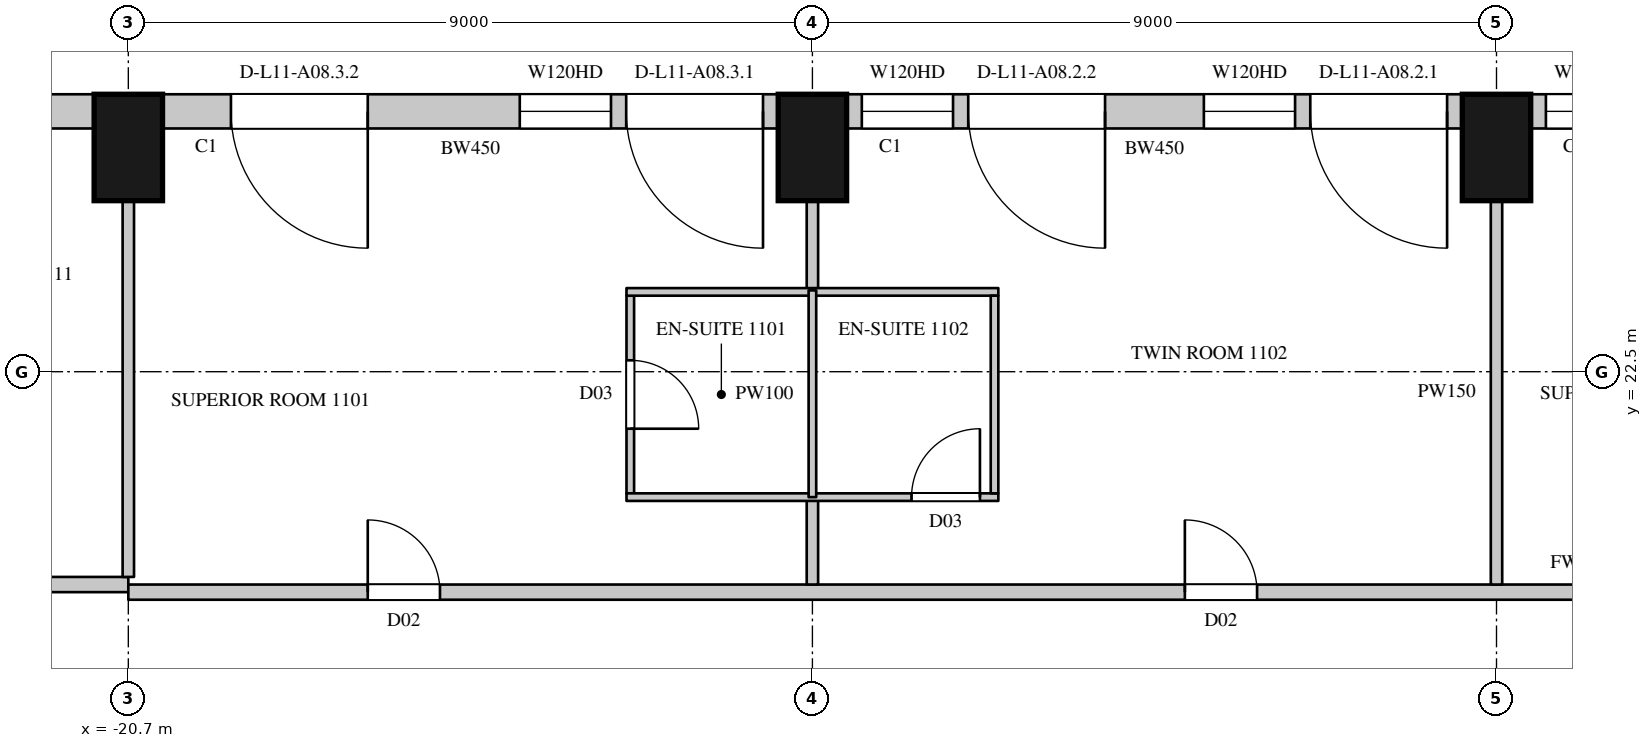
"""IFC4 building model, lengths in metres.
Left out: names, types, materials, properties, quantities, classifications, styles, units other than length and angle.
Written with IfcOpenShell. Run it as: python <this file> out.ifc"""

import sys

from ifc_helpers import new_model, si_unit, direction, frame, frame_2d, origin, origin_2d, place, context, subcontext, project, spatial, rectangle, extrude, element, fill, save


model = new_model("IFC4")
c1 = context("Model", 3, precision=1e-05, world=origin(), true_north=direction((0.0, 1.0)))
c2 = subcontext(c1, "Body", "Model", "MODEL_VIEW")
j1 = project(units=[si_unit("LENGTHUNIT", "METRE"), si_unit("PLANEANGLEUNIT", "RADIAN")], contexts=[c1])
p1 = place(None, origin())
s1 = spatial("IfcSite", under=j1, at=p1, CompositionType="ELEMENT")
p2 = place(p1, origin())
s2 = spatial("IfcBuilding", under=s1, at=p2, CompositionType="ELEMENT")
p3 = place(p2, frame((0.0, 0.0, 69.9)))
s3 = spatial("IfcBuildingStorey", under=s2, at=p3, CompositionType="ELEMENT", Elevation=69.9)
for number, where, z_axis, x_axis in (
    (1, (-2.7, 25.45, 0.0), (0.0, 0.0, 1.0), (-1.0, 0.0, 0.0)),
    (2, (-11.7, 25.45, 0.0), (0.0, 0.0, 1.0), (-1.0, 0.0, 0.0)),
    (3, (-20.7, 25.45, 0.0), (0.0, 0.0, 1.0), (-1.0, 0.0, 0.0)),
):
    element("IfcColumn", number, at=place(p3, frame(where, z_axis=z_axis, x_axis=x_axis)), inside=s3, PredefinedType="COLUMN", context=c2, shape_type="SweptSolid", body=[
        extrude(rectangle(XDim=0.9, YDim=1.4, at=origin_2d()), origin(), (0.0, 0.0, 1.0), 3.6),
    ])
p4 = place(p3, frame((5.85, 25.925, 0.0), z_axis=(0.0, 0.0, 1.0), x_axis=(-1.0, 0.0, 0.0)))
e4 = element("IfcWall", 4, at=p4, inside=s3, PredefinedType="SOLIDWALL", context=c2, shape_type="SweptSolid", body=[
    extrude(rectangle(XDim=8.1, YDim=0.45, at=frame_2d((4.05, 0.0))), origin(), (0.0, 0.0, 1.0), 3.3),
])
p5 = place(p4, frame((0.2, 0.0, 0.0)))
e5 = element("IfcOpeningElement", 5, at=p5, cuts=e4, PredefinedType="OPENING", context=c2, shape_type="SweptSolid", body=[
    extrude(rectangle(XDim=1.8, YDim=2.4, at=frame_2d((0.9, 1.2))), frame((0.0, 0.235, 0.0), z_axis=(0.0, -1.0, 0.0), x_axis=(1.0, 0.0, 0.0)), (0.0, 0.0, 1.0), 0.47),
])
p6 = place(p4, frame((2.2, 0.0, 1.05)))
e6 = element("IfcOpeningElement", 6, at=p6, cuts=e4, PredefinedType="OPENING", context=c2, shape_type="SweptSolid", body=[
    extrude(rectangle(XDim=1.2, YDim=2.0, at=frame_2d((0.6, 1.0))), frame((0.0, 0.235, 0.0), z_axis=(0.0, -1.0, 0.0), x_axis=(1.0, 0.0, 0.0)), (0.0, 0.0, 1.0), 0.47),
])
p7 = place(p4, frame((4.7, 0.0, 0.0)))
e7 = element("IfcOpeningElement", 7, at=p7, cuts=e4, PredefinedType="OPENING", context=c2, shape_type="SweptSolid", body=[
    extrude(rectangle(XDim=1.8, YDim=2.4, at=frame_2d((0.9, 1.2))), frame((0.0, 0.235, 0.0), z_axis=(0.0, -1.0, 0.0), x_axis=(1.0, 0.0, 0.0)), (0.0, 0.0, 1.0), 0.47),
])
p8 = place(p4, frame((6.7, 0.0, 1.05)))
e8 = element("IfcOpeningElement", 8, at=p8, cuts=e4, PredefinedType="OPENING", context=c2, shape_type="SweptSolid", body=[
    extrude(rectangle(XDim=1.2, YDim=2.0, at=frame_2d((0.6, 1.0))), frame((0.0, 0.235, 0.0), z_axis=(0.0, -1.0, 0.0), x_axis=(1.0, 0.0, 0.0)), (0.0, 0.0, 1.0), 0.47),
])
p9 = place(p3, frame((-3.15, 25.925, 0.0), z_axis=(0.0, 0.0, 1.0), x_axis=(-1.0, 0.0, 0.0)))
e9 = element("IfcWall", 9, at=p9, inside=s3, PredefinedType="SOLIDWALL", context=c2, shape_type="SweptSolid", body=[
    extrude(rectangle(XDim=8.1, YDim=0.45, at=frame_2d((4.05, 0.0))), origin(), (0.0, 0.0, 1.0), 3.3),
])
p10 = place(p9, frame((0.2, 0.0, 0.0)))
e10 = element("IfcOpeningElement", 10, at=p10, cuts=e9, PredefinedType="OPENING", context=c2, shape_type="SweptSolid", body=[
    extrude(rectangle(XDim=1.8, YDim=2.4, at=frame_2d((0.9, 1.2))), frame((0.0, 0.235, 0.0), z_axis=(0.0, -1.0, 0.0), x_axis=(1.0, 0.0, 0.0)), (0.0, 0.0, 1.0), 0.47),
])
p11 = place(p9, frame((2.2, 0.0, 1.05)))
e11 = element("IfcOpeningElement", 11, at=p11, cuts=e9, PredefinedType="OPENING", context=c2, shape_type="SweptSolid", body=[
    extrude(rectangle(XDim=1.2, YDim=2.0, at=frame_2d((0.6, 1.0))), frame((0.0, 0.235, 0.0), z_axis=(0.0, -1.0, 0.0), x_axis=(1.0, 0.0, 0.0)), (0.0, 0.0, 1.0), 0.47),
])
p12 = place(p9, frame((4.7, 0.0, 0.0)))
e12 = element("IfcOpeningElement", 12, at=p12, cuts=e9, PredefinedType="OPENING", context=c2, shape_type="SweptSolid", body=[
    extrude(rectangle(XDim=1.8, YDim=2.4, at=frame_2d((0.9, 1.2))), frame((0.0, 0.235, 0.0), z_axis=(0.0, -1.0, 0.0), x_axis=(1.0, 0.0, 0.0)), (0.0, 0.0, 1.0), 0.47),
])
p13 = place(p9, frame((6.7, 0.0, 1.05)))
e13 = element("IfcOpeningElement", 13, at=p13, cuts=e9, PredefinedType="OPENING", context=c2, shape_type="SweptSolid", body=[
    extrude(rectangle(XDim=1.2, YDim=2.0, at=frame_2d((0.6, 1.0))), frame((0.0, 0.235, 0.0), z_axis=(0.0, -1.0, 0.0), x_axis=(1.0, 0.0, 0.0)), (0.0, 0.0, 1.0), 0.47),
])
p14 = place(p3, frame((-12.15, 25.925, 0.0), z_axis=(0.0, 0.0, 1.0), x_axis=(-1.0, 0.0, 0.0)))
e14 = element("IfcWall", 14, at=p14, inside=s3, PredefinedType="SOLIDWALL", context=c2, shape_type="SweptSolid", body=[
    extrude(rectangle(XDim=8.1, YDim=0.45, at=frame_2d((4.05, 0.0))), origin(), (0.0, 0.0, 1.0), 3.3),
])
p15 = place(p14, frame((0.2, 0.0, 0.0)))
e15 = element("IfcOpeningElement", 15, at=p15, cuts=e14, PredefinedType="OPENING", context=c2, shape_type="SweptSolid", body=[
    extrude(rectangle(XDim=1.8, YDim=2.4, at=frame_2d((0.9, 1.2))), frame((0.0, 0.235, 0.0), z_axis=(0.0, -1.0, 0.0), x_axis=(1.0, 0.0, 0.0)), (0.0, 0.0, 1.0), 0.47),
])
p16 = place(p14, frame((2.2, 0.0, 1.05)))
e16 = element("IfcOpeningElement", 16, at=p16, cuts=e14, PredefinedType="OPENING", context=c2, shape_type="SweptSolid", body=[
    extrude(rectangle(XDim=1.2, YDim=2.0, at=frame_2d((0.6, 1.0))), frame((0.0, 0.235, 0.0), z_axis=(0.0, -1.0, 0.0), x_axis=(1.0, 0.0, 0.0)), (0.0, 0.0, 1.0), 0.47),
])
p17 = place(p14, frame((5.4, 0.0, 0.0)))
e17 = element("IfcOpeningElement", 17, at=p17, cuts=e14, PredefinedType="OPENING", context=c2, shape_type="SweptSolid", body=[
    extrude(rectangle(XDim=1.8, YDim=2.4, at=frame_2d((0.9, 1.2))), frame((0.0, 0.235, 0.0), z_axis=(0.0, -1.0, 0.0), x_axis=(1.0, 0.0, 0.0)), (0.0, 0.0, 1.0), 0.47),
])
p18 = place(p3, frame((-21.15, 25.925, 0.0), z_axis=(0.0, 0.0, 1.0), x_axis=(-1.0, 0.0, 0.0)))
e18 = element("IfcWall", 18, at=p18, inside=s3, PredefinedType="SOLIDWALL", context=c2, shape_type="SweptSolid", body=[
    extrude(rectangle(XDim=2.914, YDim=0.45, at=frame_2d((1.457, 0.0))), origin(), (0.0, 0.0, 1.0), 3.3),
])
p19 = place(p3, frame((-23.7, 19.7, 0.0), z_axis=(0.0, 0.0, 1.0), x_axis=(1.0, 0.0, 0.0)))
e19 = element("IfcWall", 19, at=p19, inside=s3, PredefinedType="PARTITIONING", context=c2, shape_type="SweptSolid", body=[
    extrude(rectangle(XDim=3.0, YDim=0.2, at=frame_2d((1.5, 0.0))), origin(), (0.0, 0.0, 1.0), 3.3),
])
p20 = place(p19, frame((0.8, 0.0, 0.0)))
e20 = element("IfcOpeningElement", 20, at=p20, cuts=e19, PredefinedType="OPENING", context=c2, shape_type="SweptSolid", body=[
    extrude(rectangle(XDim=0.9, YDim=2.2, at=frame_2d((0.45, 1.1))), frame((0.0, 0.11, 0.0), z_axis=(0.0, -1.0, 0.0), x_axis=(1.0, 0.0, 0.0)), (0.0, 0.0, 1.0), 0.22),
])
p21 = place(p3, frame((-20.7, 19.6, 0.0), z_axis=(0.0, 0.0, 1.0), x_axis=(1.0, 0.0, 0.0)))
e21 = element("IfcWall", 21, at=p21, inside=s3, PredefinedType="PARTITIONING", context=c2, shape_type="SweptSolid", body=[
    extrude(rectangle(XDim=38.184, YDim=0.2, at=frame_2d((19.092, 0.0))), origin(), (0.0, 0.0, 1.0), 3.3),
])
p22 = place(p21, frame((3.15, 0.0, 0.0)))
e22 = element("IfcOpeningElement", 22, at=p22, cuts=e21, PredefinedType="OPENING", context=c2, shape_type="SweptSolid", body=[
    extrude(rectangle(XDim=0.95, YDim=2.2, at=frame_2d((0.475, 1.1))), frame((0.0, 0.11, 0.0), z_axis=(0.0, -1.0, 0.0), x_axis=(1.0, 0.0, 0.0)), (0.0, 0.0, 1.0), 0.22),
])
p23 = place(p21, frame((13.9, 0.0, 0.0)))
e23 = element("IfcOpeningElement", 23, at=p23, cuts=e21, PredefinedType="OPENING", context=c2, shape_type="SweptSolid", body=[
    extrude(rectangle(XDim=0.95, YDim=2.2, at=frame_2d((0.475, 1.1))), frame((0.0, 0.11, 0.0), z_axis=(0.0, -1.0, 0.0), x_axis=(1.0, 0.0, 0.0)), (0.0, 0.0, 1.0), 0.22),
])
p24 = place(p21, frame((21.15, 0.0, 0.0)))
e24 = element("IfcOpeningElement", 24, at=p24, cuts=e21, PredefinedType="OPENING", context=c2, shape_type="SweptSolid", body=[
    extrude(rectangle(XDim=0.95, YDim=2.2, at=frame_2d((0.475, 1.1))), frame((0.0, 0.11, 0.0), z_axis=(0.0, -1.0, 0.0), x_axis=(1.0, 0.0, 0.0)), (0.0, 0.0, 1.0), 0.22),
])
p25 = place(p21, frame((31.9, 0.0, 0.0)))
e25 = element("IfcOpeningElement", 25, at=p25, cuts=e21, PredefinedType="OPENING", context=c2, shape_type="SweptSolid", body=[
    extrude(rectangle(XDim=0.95, YDim=2.2, at=frame_2d((0.475, 1.1))), frame((0.0, 0.11, 0.0), z_axis=(0.0, -1.0, 0.0), x_axis=(1.0, 0.0, 0.0)), (0.0, 0.0, 1.0), 0.22),
])
p26 = place(p21, frame((36.85, 0.0, 0.0)))
e26 = element("IfcOpeningElement", 26, at=p26, cuts=e21, PredefinedType="OPENING", context=c2, shape_type="SweptSolid", body=[
    extrude(rectangle(XDim=0.95, YDim=2.2, at=frame_2d((0.475, 1.1))), frame((0.0, 0.11, 0.0), z_axis=(0.0, -1.0, 0.0), x_axis=(1.0, 0.0, 0.0)), (0.0, 0.0, 1.0), 0.22),
])
p27 = place(p3, frame((-20.7, 19.8, 0.0), z_axis=(0.0, 0.0, 1.0), x_axis=(0.0, 1.0, 0.0)))
e27 = element("IfcWall", 27, at=p27, inside=s3, PredefinedType="PARTITIONING", context=c2, shape_type="SweptSolid", body=[
    extrude(rectangle(XDim=4.95, YDim=0.15, at=frame_2d((2.475, 0.0))), origin(), (0.0, 0.0, 1.0), 2.75),
])
p28 = place(p3, frame((-11.7, 19.7, 0.0), z_axis=(0.0, 0.0, 1.0), x_axis=(0.0, 1.0, 0.0)))
e28 = element("IfcWall", 28, at=p28, inside=s3, PredefinedType="PARTITIONING", context=c2, shape_type="SweptSolid", body=[
    extrude(rectangle(XDim=1.15, YDim=0.15, at=frame_2d((0.575, 0.0))), origin(), (0.0, 0.0, 1.0), 2.75),
])
p29 = place(p3, frame((-11.7, 23.57, 0.0), z_axis=(0.0, 0.0, 1.0), x_axis=(0.0, 1.0, 0.0)))
e29 = element("IfcWall", 29, at=p29, inside=s3, PredefinedType="PARTITIONING", context=c2, shape_type="SweptSolid", body=[
    extrude(rectangle(XDim=1.18, YDim=0.15, at=frame_2d((0.59, 0.0))), origin(), (0.0, 0.0, 1.0), 2.75),
])
p30 = place(p3, frame((-2.7, 19.7, 0.0), z_axis=(0.0, 0.0, 1.0), x_axis=(0.0, 1.0, 0.0)))
e30 = element("IfcWall", 30, at=p30, inside=s3, PredefinedType="PARTITIONING", context=c2, shape_type="SweptSolid", body=[
    extrude(rectangle(XDim=5.05, YDim=0.15, at=frame_2d((2.525, 0.0))), origin(), (0.0, 0.0, 1.0), 2.75),
])
p31 = place(p3, frame((-14.096, 20.9, 0.0), z_axis=(0.0, 0.0, 1.0), x_axis=(0.0, 1.0, 0.0)))
e31 = element("IfcWall", 31, at=p31, inside=s3, PredefinedType="PARTITIONING", context=c2, shape_type="SweptSolid", body=[
    extrude(rectangle(XDim=2.6, YDim=0.1, at=frame_2d((1.3, 0.0))), origin(), (0.0, 0.0, 1.0), 3.3),
])
p32 = place(p31, frame((0.85, 0.0, 0.0)))
e32 = element("IfcOpeningElement", 32, at=p32, cuts=e31, PredefinedType="OPENING", context=c2, shape_type="SweptSolid", body=[
    extrude(rectangle(XDim=0.9, YDim=2.2, at=frame_2d((0.45, 1.1))), frame((0.0, 0.06, 0.0), z_axis=(0.0, -1.0, 0.0), x_axis=(1.0, 0.0, 0.0)), (0.0, 0.0, 1.0), 0.12),
])
p33 = place(p3, frame((-14.146, 20.85, 0.0), z_axis=(0.0, 0.0, 1.0), x_axis=(1.0, 0.0, 0.0)))
e33 = element("IfcWall", 33, at=p33, inside=s3, PredefinedType="PARTITIONING", context=c2, shape_type="SweptSolid", body=[
    extrude(rectangle(XDim=4.892, YDim=0.1, at=frame_2d((2.446, 0.0))), origin(), (0.0, 0.0, 1.0), 3.3),
])
p34 = place(p33, frame((3.75, 0.0, 0.0)))
e34 = element("IfcOpeningElement", 34, at=p34, cuts=e33, PredefinedType="OPENING", context=c2, shape_type="SweptSolid", body=[
    extrude(rectangle(XDim=0.9, YDim=2.2, at=frame_2d((0.45, 1.1))), frame((0.0, 0.06, 0.0), z_axis=(0.0, -1.0, 0.0), x_axis=(1.0, 0.0, 0.0)), (0.0, 0.0, 1.0), 0.12),
])
p35 = place(p3, frame((-14.146, 23.55, 0.0), z_axis=(0.0, 0.0, 1.0), x_axis=(1.0, 0.0, 0.0)))
e35 = element("IfcWall", 35, at=p35, inside=s3, PredefinedType="PARTITIONING", context=c2, shape_type="SweptSolid", body=[
    extrude(rectangle(XDim=4.892, YDim=0.1, at=frame_2d((2.446, 0.0))), origin(), (0.0, 0.0, 1.0), 3.3),
])
p36 = place(p3, frame((-11.7, 20.85, 0.0), z_axis=(0.0, 0.0, 1.0), x_axis=(0.0, 1.0, 0.0)))
e36 = element("IfcWall", 36, at=p36, inside=s3, PredefinedType="PARTITIONING", context=c2, shape_type="SweptSolid", body=[
    extrude(rectangle(XDim=2.72, YDim=0.1, at=frame_2d((1.36, 0.0))), origin(), (0.0, 0.0, 1.0), 2.75),
])
p37 = place(p3, frame((-9.304, 20.9, 0.0), z_axis=(0.0, 0.0, 1.0), x_axis=(0.0, 1.0, 0.0)))
e37 = element("IfcWall", 37, at=p37, inside=s3, PredefinedType="PARTITIONING", context=c2, shape_type="SweptSolid", body=[
    extrude(rectangle(XDim=2.6, YDim=0.1, at=frame_2d((1.3, 0.0))), origin(), (0.0, 0.0, 1.0), 3.3),
])
p38 = place(p8, origin())
e38 = element("IfcWindow", 38, at=p38, inside=s3, PartitioningType="SINGLE_PANEL", PredefinedType="WINDOW", context=c2, shape_type="SweptSolid", body=[
    extrude(rectangle(XDim=1.2, YDim=2.0, at=frame_2d((0.6, 1.0))), frame((0.0, 0.135, 0.0), z_axis=(0.0, -1.0, 0.0), x_axis=(1.0, 0.0, 0.0)), (0.0, 0.0, 1.0), 0.06),
])
fill(e8, e38)
p39 = place(p10, origin())
e39 = element("IfcDoor", 39, at=p39, inside=s3, OperationType="SLIDING_TO_LEFT", PredefinedType="DOOR", context=c2, shape_type="SweptSolid", body=[
    extrude(rectangle(XDim=1.8, YDim=2.4, at=frame_2d((0.9, 1.2))), frame((0.0, 0.13, 0.0), z_axis=(0.0, -1.0, 0.0), x_axis=(1.0, 0.0, 0.0)), (0.0, 0.0, 1.0), 0.05),
])
fill(e10, e39)
p40 = place(p11, origin())
e40 = element("IfcWindow", 40, at=p40, inside=s3, PartitioningType="SINGLE_PANEL", PredefinedType="WINDOW", context=c2, shape_type="SweptSolid", body=[
    extrude(rectangle(XDim=1.2, YDim=2.0, at=frame_2d((0.6, 1.0))), frame((0.0, 0.135, 0.0), z_axis=(0.0, -1.0, 0.0), x_axis=(1.0, 0.0, 0.0)), (0.0, 0.0, 1.0), 0.06),
])
fill(e11, e40)
p41 = place(p12, origin())
e41 = element("IfcDoor", 41, at=p41, inside=s3, OperationType="SLIDING_TO_LEFT", PredefinedType="DOOR", context=c2, shape_type="SweptSolid", body=[
    extrude(rectangle(XDim=1.8, YDim=2.4, at=frame_2d((0.9, 1.2))), frame((0.0, 0.13, 0.0), z_axis=(0.0, -1.0, 0.0), x_axis=(1.0, 0.0, 0.0)), (0.0, 0.0, 1.0), 0.05),
])
fill(e12, e41)
p42 = place(p13, origin())
e42 = element("IfcWindow", 42, at=p42, inside=s3, PartitioningType="SINGLE_PANEL", PredefinedType="WINDOW", context=c2, shape_type="SweptSolid", body=[
    extrude(rectangle(XDim=1.2, YDim=2.0, at=frame_2d((0.6, 1.0))), frame((0.0, 0.135, 0.0), z_axis=(0.0, -1.0, 0.0), x_axis=(1.0, 0.0, 0.0)), (0.0, 0.0, 1.0), 0.06),
])
fill(e13, e42)
p43 = place(p15, origin())
e43 = element("IfcDoor", 43, at=p43, inside=s3, OperationType="SLIDING_TO_LEFT", PredefinedType="DOOR", context=c2, shape_type="SweptSolid", body=[
    extrude(rectangle(XDim=1.8, YDim=2.4, at=frame_2d((0.9, 1.2))), frame((0.0, 0.13, 0.0), z_axis=(0.0, -1.0, 0.0), x_axis=(1.0, 0.0, 0.0)), (0.0, 0.0, 1.0), 0.05),
])
fill(e15, e43)
p44 = place(p16, origin())
e44 = element("IfcWindow", 44, at=p44, inside=s3, PartitioningType="SINGLE_PANEL", PredefinedType="WINDOW", context=c2, shape_type="SweptSolid", body=[
    extrude(rectangle(XDim=1.2, YDim=2.0, at=frame_2d((0.6, 1.0))), frame((0.0, 0.135, 0.0), z_axis=(0.0, -1.0, 0.0), x_axis=(1.0, 0.0, 0.0)), (0.0, 0.0, 1.0), 0.06),
])
fill(e16, e44)
p45 = place(p17, origin())
e45 = element("IfcDoor", 45, at=p45, inside=s3, OperationType="SLIDING_TO_LEFT", PredefinedType="DOOR", context=c2, shape_type="SweptSolid", body=[
    extrude(rectangle(XDim=1.8, YDim=2.4, at=frame_2d((0.9, 1.2))), frame((0.0, 0.13, 0.0), z_axis=(0.0, -1.0, 0.0), x_axis=(1.0, 0.0, 0.0)), (0.0, 0.0, 1.0), 0.05),
])
fill(e17, e45)
p46 = place(p22, origin())
e46 = element("IfcDoor", 46, at=p46, inside=s3, OperationType="SINGLE_SWING_LEFT", PredefinedType="DOOR", context=c2, shape_type="SweptSolid", body=[
    extrude(rectangle(XDim=0.95, YDim=2.2, at=frame_2d((0.475, 1.1))), frame((0.0, 0.025, 0.0), z_axis=(0.0, -1.0, 0.0), x_axis=(1.0, 0.0, 0.0)), (0.0, 0.0, 1.0), 0.05),
])
fill(e22, e46)
p47 = place(p32, origin())
e47 = element("IfcDoor", 47, at=p47, inside=s3, OperationType="SINGLE_SWING_RIGHT", PredefinedType="DOOR", context=c2, shape_type="SweptSolid", body=[
    extrude(rectangle(XDim=0.9, YDim=2.2, at=frame_2d((0.45, 1.1))), frame((0.0, 0.025, 0.0), z_axis=(0.0, -1.0, 0.0), x_axis=(1.0, 0.0, 0.0)), (0.0, 0.0, 1.0), 0.05),
])
fill(e32, e47)
p48 = place(p23, origin())
e48 = element("IfcDoor", 48, at=p48, inside=s3, OperationType="SINGLE_SWING_LEFT", PredefinedType="DOOR", context=c2, shape_type="SweptSolid", body=[
    extrude(rectangle(XDim=0.95, YDim=2.2, at=frame_2d((0.475, 1.1))), frame((0.0, 0.025, 0.0), z_axis=(0.0, -1.0, 0.0), x_axis=(1.0, 0.0, 0.0)), (0.0, 0.0, 1.0), 0.05),
])
fill(e23, e48)
p49 = place(p34, origin())
e49 = element("IfcDoor", 49, at=p49, inside=s3, OperationType="SINGLE_SWING_RIGHT", PredefinedType="DOOR", context=c2, shape_type="SweptSolid", body=[
    extrude(rectangle(XDim=0.9, YDim=2.2, at=frame_2d((0.45, 1.1))), frame((0.0, 0.025, 0.0), z_axis=(0.0, -1.0, 0.0), x_axis=(1.0, 0.0, 0.0)), (0.0, 0.0, 1.0), 0.05),
])
fill(e34, e49)
save(model, sys.argv[1])
